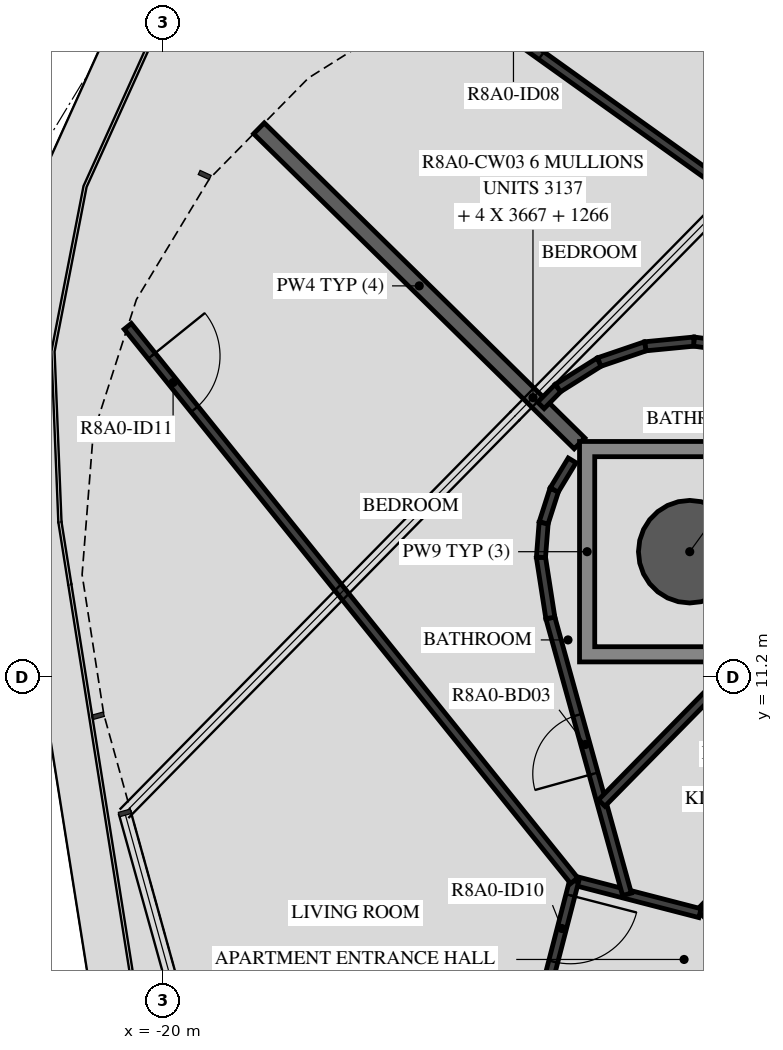
"""IFC4 building model, lengths in metres.
Left out: names, types, materials, properties, quantities, classifications, styles, units other than length and angle.
Written with IfcOpenShell. Run it as: python <this file> out.ifc"""

import sys

from ifc_helpers import new_model, si_unit, direction, frame, frame_2d, origin, origin_2d, place, context, subcontext, project, spatial, polyline, rectangle, hollow_circle, outline, extrude, element, fill, save


model = new_model("IFC4")
c1 = context("Model", 3, precision=1e-05, world=origin(), true_north=direction((0.0, 1.0)))
c2 = subcontext(c1, "Body", "Model", "MODEL_VIEW")
j1 = project(units=[si_unit("LENGTHUNIT", "METRE"), si_unit("PLANEANGLEUNIT", "RADIAN")], contexts=[c1])
p1 = place(None, origin())
s1 = spatial("IfcSite", under=j1, at=p1, CompositionType="ELEMENT")
p2 = place(p1, origin())
s2 = spatial("IfcBuilding", under=s1, at=p2, CompositionType="ELEMENT")
p3 = place(p2, frame((0.0, 0.0, 298.2)))
s3 = spatial("IfcBuildingStorey", under=s2, at=p3, CompositionType="ELEMENT", Elevation=298.2)
p4 = place(p3, frame((-13.073, 12.847, -0.45), z_axis=(0.0, 0.0, 1.0), x_axis=(1.0, 0.0, 0.0)))
e1 = element("IfcColumn", 1, at=p4, inside=s3, PredefinedType="COLUMN", context=c2, shape_type="SweptSolid", body=[
    extrude(hollow_circle(Radius=0.675, WallThickness=0.03, at=origin_2d()), origin(), (0.0, 0.0, 1.0), 3.57),
])
p5 = place(p3, frame((-18.741, 18.417, 0.0), z_axis=(0.0, 0.0, 1.0), x_axis=(0.713252414586, -0.700907264256, 0.0)))
e2 = element("IfcWall", 2, at=p5, inside=s3, PredefinedType="STANDARD", context=c2, shape_type="SweptSolid", body=[
    extrude(rectangle(XDim=5.913, YDim=0.2, at=frame_2d((2.957, 0.0))), origin(), (0.0, 0.0, 1.0), 3.12),
])
p6 = place(p3, frame((-7.974, 13.144, 0.0), z_axis=(0.0, 0.0, 1.0), x_axis=(-0.700910366085, -0.713249366432, 0.0)))
e3 = element("IfcWall", 3, at=p6, inside=s3, PredefinedType="PARTITIONING", context=c2, shape_type="SweptSolid", body=[
    extrude(rectangle(XDim=7.083, YDim=0.12, at=frame_2d((3.542, 0.0))), origin(), (0.0, 0.0, 1.0), 3.12),
])
p7 = place(p6, frame((3.986, 0.0, 0.0)))
e4 = element("IfcOpeningElement", 4, at=p7, cuts=e3, PredefinedType="OPENING", context=c2, shape_type="SweptSolid", body=[
    extrude(rectangle(XDim=0.9, YDim=2.1, at=frame_2d((0.45, 1.05))), frame((0.0, 0.07, 0.0), z_axis=(0.0, -1.0, 0.0), x_axis=(1.0, 0.0, 0.0)), (0.0, 0.0, 1.0), 0.14),
])
p8 = place(p3, frame((-16.165, 20.188, 0.0), z_axis=(0.0, 0.0, 1.0), x_axis=(0.813459166979, -0.581622028175, 0.0)))
e5 = element("IfcWall", 5, at=p8, inside=s3, PredefinedType="PARTITIONING", context=c2, shape_type="SweptSolid", body=[
    extrude(rectangle(XDim=9.565, YDim=0.12, at=frame_2d((4.782, 0.0))), origin(), (0.0, 0.0, 1.0), 3.12),
])
p9 = place(p8, frame((0.5, 0.0, 0.0)))
e6 = element("IfcOpeningElement", 6, at=p9, cuts=e5, PredefinedType="OPENING", context=c2, shape_type="SweptSolid", body=[
    extrude(rectangle(XDim=0.9, YDim=2.1, at=frame_2d((0.45, 1.05))), frame((0.0, 0.07, 0.0), z_axis=(0.0, -1.0, 0.0), x_axis=(1.0, 0.0, 0.0)), (0.0, 0.0, 1.0), 0.14),
])
p10 = place(p3, frame((-15.032, 14.772, 0.0), z_axis=(0.0, 0.0, 1.0), x_axis=(0.701378407906, 0.712789119532, 0.0)))
e7 = element("IfcWall", 7, at=p10, inside=s3, PredefinedType="PARTITIONING", context=c2, shape_type="SweptSolid", body=[
    extrude(rectangle(XDim=0.321, YDim=0.12, at=frame_2d((0.161, 0.0))), origin(), (0.0, 0.0, 1.0), 3.12),
])
p11 = place(p3, frame((-14.807, 15.0, 0.0), z_axis=(0.0, 0.0, 1.0), x_axis=(0.846499451836, 0.532389592349, 0.0)))
e8 = element("IfcWall", 8, at=p11, inside=s3, PredefinedType="PARTITIONING", context=c2, shape_type="SweptSolid", body=[
    extrude(rectangle(XDim=0.642, YDim=0.12, at=frame_2d((0.321, 0.0))), origin(), (0.0, 0.0, 1.0), 3.12),
])
for number, where, z_axis, x_axis in (
    (9, (-14.263, 15.342, 0.0), (0.0, 0.0, 1.0), (0.946, 0.323, 0.0)),
    (10, (-13.656, 15.55, 0.0), (0.0, 0.0, 1.0), (0.995, 0.096, 0.0)),
):
    element("IfcWall", number, at=place(p3, frame(where, z_axis=z_axis, x_axis=x_axis)), inside=s3, PredefinedType="PARTITIONING", context=c2, shape_type="SweptSolid", body=[
        extrude(rectangle(XDim=0.642, YDim=0.12, at=frame_2d((0.321, 0.0))), origin(), (0.0, 0.0, 1.0), 3.12),
    ])
p12 = place(p3, frame((-13.017, 15.611, 0.0), z_axis=(0.0, 0.0, 1.0), x_axis=(0.990688406717, -0.136148745119, 0.0)))
e11 = element("IfcWall", 11, at=p12, inside=s3, PredefinedType="PARTITIONING", context=c2, shape_type="SweptSolid", body=[
    extrude(rectangle(XDim=0.947, YDim=0.12, at=frame_2d((0.473, 0.0))), origin(), (0.0, 0.0, 1.0), 3.12),
])
p13 = place(p3, frame((-12.939, 8.092, 0.0), z_axis=(0.0, 0.0, 1.0), x_axis=(-0.968179141411, 0.250258166974, 0.0)))
e12 = element("IfcWall", 12, at=p13, inside=s3, PredefinedType="PARTITIONING", context=c2, shape_type="SweptSolid", body=[
    extrude(rectangle(XDim=1.709, YDim=0.12, at=frame_2d((0.854, 0.0))), origin(), (0.0, 0.0, 1.0), 3.12),
])
p14 = place(p3, frame((-14.594, 8.519, 0.0), z_axis=(0.0, 0.0, 1.0), x_axis=(-0.250468695288, -0.968124698931, 0.0)))
e13 = element("IfcWall", 13, at=p14, inside=s3, PredefinedType="PARTITIONING", context=c2, shape_type="SweptSolid", body=[
    extrude(rectangle(XDim=1.7, YDim=0.12, at=frame_2d((0.85, 0.0))), origin(), (0.0, 0.0, 1.0), 3.12),
])
p15 = place(p14, frame((0.2, 0.0, 0.0)))
e14 = element("IfcOpeningElement", 14, at=p15, cuts=e13, PredefinedType="OPENING", context=c2, shape_type="SweptSolid", body=[
    extrude(rectangle(XDim=0.9, YDim=2.1, at=frame_2d((0.45, 1.05))), frame((0.0, 0.07, 0.0), z_axis=(0.0, -1.0, 0.0), x_axis=(1.0, 0.0, 0.0)), (0.0, 0.0, 1.0), 0.14),
])
p16 = place(p3, frame((-13.899, 8.34, 0.0), z_axis=(0.0, 0.0, 1.0), x_axis=(-0.267286775597, 0.963617029525, 0.0)))
e15 = element("IfcWall", 15, at=p16, inside=s3, PredefinedType="PARTITIONING", context=c2, shape_type="SweptSolid", body=[
    extrude(rectangle(XDim=3.773, YDim=0.12, at=frame_2d((1.887, 0.0))), origin(), (0.0, 0.0, 1.0), 3.12),
])
p17 = place(p16, frame((1.646, 0.0, 0.0)))
e16 = element("IfcOpeningElement", 16, at=p17, cuts=e15, PredefinedType="OPENING", context=c2, shape_type="SweptSolid", body=[
    extrude(rectangle(XDim=0.8, YDim=2.1, at=frame_2d((0.4, 1.05))), frame((0.0, 0.07, 0.0), z_axis=(0.0, -1.0, 0.0), x_axis=(1.0, 0.0, 0.0)), (0.0, 0.0, 1.0), 0.14),
])
p18 = place(p3, frame((-14.907, 11.976, 0.0), z_axis=(0.0, 0.0, 1.0), x_axis=(-0.153398456533, 0.988164416245, 0.0)))
e17 = element("IfcWall", 17, at=p18, inside=s3, PredefinedType="PARTITIONING", context=c2, shape_type="SweptSolid", body=[
    extrude(rectangle(XDim=0.807, YDim=0.12, at=frame_2d((0.403, 0.0))), origin(), (0.0, 0.0, 1.0), 3.12),
])
for number, where, z_axis, x_axis in (
    (18, (-15.031, 12.773, 0.0), (0.0, 0.0, 1.0), (0.078, 0.997, 0.0)),
    (19, (-14.995, 13.227, 0.0), (0.0, 0.0, 1.0), (0.306, 0.952, 0.0)),
    (20, (-14.856, 13.66, 0.0), (0.0, 0.0, 1.0), (0.518, 0.855, 0.0)),
):
    element("IfcWall", number, at=place(p3, frame(where, z_axis=z_axis, x_axis=x_axis)), inside=s3, PredefinedType="PARTITIONING", context=c2, shape_type="SweptSolid", body=[
        extrude(rectangle(XDim=0.455, YDim=0.12, at=frame_2d((0.228, 0.0))), origin(), (0.0, 0.0, 1.0), 3.12),
    ])
p19 = place(p3, frame((-20.466, 15.812, 0.0), z_axis=(0.0, 0.0, 1.0), x_axis=(0.62719424473, -0.77886287585, 0.0)))
e21 = element("IfcWall", 21, at=p19, inside=s3, PredefinedType="PARTITIONING", context=c2, shape_type="SweptSolid", body=[
    extrude(rectangle(XDim=9.364, YDim=0.12, at=frame_2d((4.682, 0.0))), origin(), (0.0, 0.0, 1.0), 3.12),
])
p20 = place(p19, frame((0.5, 0.0, 0.0)))
e22 = element("IfcOpeningElement", 22, at=p20, cuts=e21, PredefinedType="OPENING", context=c2, shape_type="SweptSolid", body=[
    extrude(rectangle(XDim=0.9, YDim=2.1, at=frame_2d((0.45, 1.05))), frame((0.0, 0.07, 0.0), z_axis=(0.0, -1.0, 0.0), x_axis=(1.0, 0.0, 0.0)), (0.0, 0.0, 1.0), 0.14),
])
p21 = place(p3, frame((-14.232, 9.54, 0.0), z_axis=(0.0, 0.0, 1.0), x_axis=(0.700890401548, 0.713268985038, 0.0)))
e23 = element("IfcWall", 23, at=p21, inside=s3, PredefinedType="PARTITIONING", context=c2, shape_type="SweptSolid", body=[
    extrude(rectangle(XDim=2.604, YDim=0.12, at=frame_2d((1.302, 0.0))), origin(), (0.0, 0.0, 1.0), 3.12),
])
p22 = place(p3, origin())
e24 = element("IfcWall", 24, at=p22, inside=s3, PredefinedType="STANDARD", context=c2, shape_type="SweptSolid", body=[
    extrude(outline(polyline([(-11.623, 14.297), (-11.623, 11.397), (-14.523, 11.397), (-14.523, 14.297), (-11.623, 14.297)]), holes=[polyline([(-14.323, 11.597), (-11.823, 11.597), (-11.823, 14.097), (-14.323, 14.097), (-14.323, 11.597)])]), origin(), (0.0, 0.0, 1.0), 3.12),
])
p23 = place(p9, origin())
e25 = element("IfcDoor", 25, at=p23, inside=s3, OperationType="SINGLE_SWING_RIGHT", PredefinedType="DOOR", context=c2, shape_type="SweptSolid", body=[
    extrude(rectangle(XDim=0.9, YDim=2.1, at=frame_2d((0.45, 1.05))), frame((0.0, 0.025, 0.0), z_axis=(0.0, -1.0, 0.0), x_axis=(1.0, 0.0, 0.0)), (0.0, 0.0, 1.0), 0.05),
])
fill(e6, e25)
p24 = place(p15, origin())
e26 = element("IfcDoor", 26, at=p24, inside=s3, OperationType="SINGLE_SWING_LEFT", PredefinedType="DOOR", context=c2, shape_type="SweptSolid", body=[
    extrude(rectangle(XDim=0.9, YDim=2.1, at=frame_2d((0.45, 1.05))), frame((0.0, 0.025, 0.0), z_axis=(0.0, -1.0, 0.0), x_axis=(1.0, 0.0, 0.0)), (0.0, 0.0, 1.0), 0.05),
])
fill(e14, e26)
p25 = place(p20, origin())
e27 = element("IfcDoor", 27, at=p25, inside=s3, OperationType="SINGLE_SWING_LEFT", PredefinedType="DOOR", context=c2, shape_type="SweptSolid", body=[
    extrude(rectangle(XDim=0.9, YDim=2.1, at=frame_2d((0.45, 1.05))), frame((0.0, 0.025, 0.0), z_axis=(0.0, -1.0, 0.0), x_axis=(1.0, 0.0, 0.0)), (0.0, 0.0, 1.0), 0.05),
])
fill(e22, e27)
p26 = place(p17, origin())
e28 = element("IfcDoor", 28, at=p26, inside=s3, OperationType="SINGLE_SWING_RIGHT", PredefinedType="DOOR", context=c2, shape_type="SweptSolid", body=[
    extrude(rectangle(XDim=0.8, YDim=2.1, at=frame_2d((0.4, 1.05))), frame((0.0, 0.025, 0.0), z_axis=(0.0, -1.0, 0.0), x_axis=(1.0, 0.0, 0.0)), (0.0, 0.0, 1.0), 0.05),
])
fill(e16, e28)
save(model, sys.argv[1])
